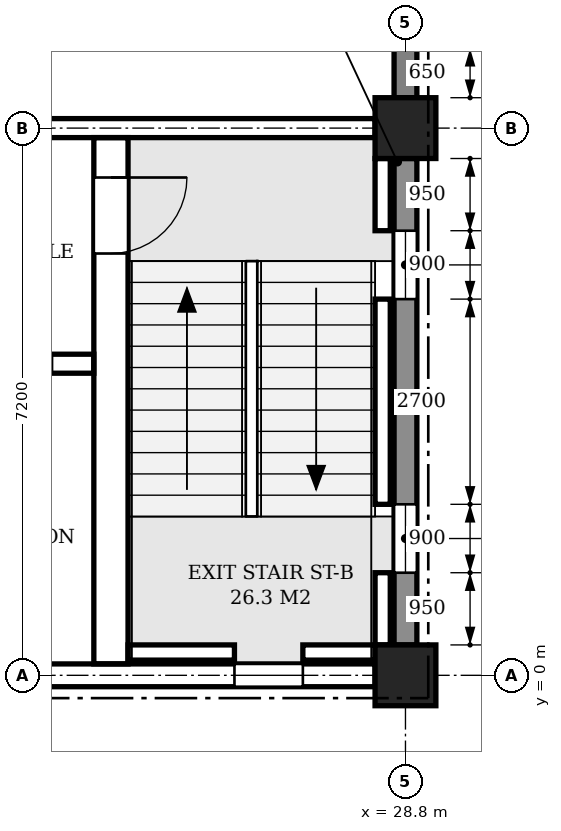
"""IFC4 building model, lengths in metres.
Left out: names, types, materials, properties, quantities, classifications, styles, units other than length and angle.
Written with IfcOpenShell. Run it as: python <this file> out.ifc"""

import sys

from ifc_helpers import new_model, si_unit, direction, frame, frame_2d, origin, origin_2d, place, context, subcontext, project, spatial, polyline, rectangle, outline, extrude, element, fill, save


model = new_model("IFC4")
c1 = context("Model", 3, precision=1e-05, world=origin(), true_north=direction((0.0, 1.0)))
c2 = subcontext(c1, "Body", "Model", "MODEL_VIEW")
j1 = project(units=[si_unit("LENGTHUNIT", "METRE"), si_unit("PLANEANGLEUNIT", "RADIAN")], contexts=[c1])
p1 = place(None, origin())
s1 = spatial("IfcSite", under=j1, at=p1, CompositionType="ELEMENT")
p2 = place(p1, origin())
s2 = spatial("IfcBuilding", under=s1, at=p2, CompositionType="ELEMENT")
p3 = place(p2, frame((0.0, 0.0, 49.8)))
s3 = spatial("IfcBuildingStorey", under=s2, at=p3, CompositionType="ELEMENT", Elevation=49.8)
for number, where, z_axis, x_axis in (
    (1, (28.8, 0.0, 0.0), (0.0, 0.0, 1.0), (1.0, 0.0, 0.0)),
    (2, (28.8, 7.2, 0.0), (0.0, 0.0, 1.0), (1.0, 0.0, 0.0)),
):
    element("IfcColumn", number, at=place(p3, frame(where, z_axis=z_axis, x_axis=x_axis)), inside=s3, PredefinedType="COLUMN", context=c2, shape_type="SweptSolid", body=[
        extrude(rectangle(XDim=0.8, YDim=0.8, at=origin_2d()), origin(), (0.0, 0.0, 1.0), 4.5),
    ])
p4 = place(p3, frame((22.0, 0.0, 0.0), z_axis=(0.0, 0.0, 1.0), x_axis=(1.0, 0.0, 0.0)))
e3 = element("IfcWall", 3, at=p4, inside=s3, PredefinedType="STANDARD", context=c2, shape_type="SweptSolid", body=[
    extrude(rectangle(XDim=6.4, YDim=0.3, at=frame_2d((3.2, 0.0))), origin(), (0.0, 0.0, 1.0), 3.65),
])
p5 = place(p4, frame((4.55, 0.0, 0.9)))
e4 = element("IfcOpeningElement", 4, at=p5, cuts=e3, PredefinedType="OPENING", context=c2, shape_type="SweptSolid", body=[
    extrude(outline(polyline([(0.0, 0.0), (0.9, 0.0), (0.9, 2.15), (0.45, 2.6), (0.0, 2.15), (0.0, 0.0)])), frame((0.0, 0.16, 0.0), z_axis=(0.0, -1.0, 0.0), x_axis=(1.0, 0.0, 0.0)), (0.0, 0.0, 1.0), 0.32),
])
p6 = place(p3, frame((28.8, 0.4, 0.0), z_axis=(0.0, 0.0, 1.0), x_axis=(0.0, 1.0, 0.0)))
e5 = element("IfcWall", 5, at=p6, inside=s3, PredefinedType="STANDARD", context=c2, shape_type="SweptSolid", body=[
    extrude(rectangle(XDim=6.4, YDim=0.3, at=frame_2d((3.2, 0.0))), origin(), (0.0, 0.0, 1.0), 3.65),
])
p7 = place(p6, frame((0.95, 0.0, 0.9)))
e6 = element("IfcOpeningElement", 6, at=p7, cuts=e5, PredefinedType="OPENING", context=c2, shape_type="SweptSolid", body=[
    extrude(outline(polyline([(0.0, 0.0), (0.9, 0.0), (0.9, 2.15), (0.45, 2.6), (0.0, 2.15), (0.0, 0.0)])), frame((0.0, 0.16, 0.0), z_axis=(0.0, -1.0, 0.0), x_axis=(1.0, 0.0, 0.0)), (0.0, 0.0, 1.0), 0.32),
])
p8 = place(p6, frame((4.55, 0.0, 0.9)))
e7 = element("IfcOpeningElement", 7, at=p8, cuts=e5, PredefinedType="OPENING", context=c2, shape_type="SweptSolid", body=[
    extrude(outline(polyline([(0.0, 0.0), (0.9, 0.0), (0.9, 2.15), (0.45, 2.6), (0.0, 2.15), (0.0, 0.0)])), frame((0.0, 0.16, 0.0), z_axis=(0.0, -1.0, 0.0), x_axis=(1.0, 0.0, 0.0)), (0.0, 0.0, 1.0), 0.32),
])
p9 = place(p3, frame((28.8, 7.6, 0.0), z_axis=(0.0, 0.0, 1.0), x_axis=(0.0, 1.0, 0.0)))
e8 = element("IfcWall", 8, at=p9, inside=s3, PredefinedType="STANDARD", context=c2, shape_type="SweptSolid", body=[
    extrude(rectangle(XDim=6.4, YDim=0.3, at=frame_2d((3.2, 0.0))), origin(), (0.0, 0.0, 1.0), 3.65),
])
p10 = place(p9, frame((0.65, 0.0, 0.9)))
e9 = element("IfcOpeningElement", 9, at=p10, cuts=e8, PredefinedType="OPENING", context=c2, shape_type="SweptSolid", body=[
    extrude(outline(polyline([(0.0, 0.0), (1.5, 0.0), (1.5, 1.85), (0.75, 2.6), (0.0, 1.85), (0.0, 0.0)])), frame((0.0, 0.16, 0.0), z_axis=(0.0, -1.0, 0.0), x_axis=(1.0, 0.0, 0.0)), (0.0, 0.0, 1.0), 0.32),
])
p11 = place(p3, frame((22.0, 7.2, 0.0), z_axis=(0.0, 0.0, 1.0), x_axis=(1.0, 0.0, 0.0)))
e10 = element("IfcWall", 10, at=p11, inside=s3, PredefinedType="SHEAR", context=c2, shape_type="SweptSolid", body=[
    extrude(rectangle(XDim=6.4, YDim=0.25, at=frame_2d((3.2, 0.0))), origin(), (0.0, 0.0, 1.0), 3.55),
])
p12 = place(p11, frame((0.45, 0.0, 0.0)))
e11 = element("IfcOpeningElement", 11, at=p12, cuts=e10, PredefinedType="OPENING", context=c2, shape_type="SweptSolid", body=[
    extrude(rectangle(XDim=1.1, YDim=2.1, at=frame_2d((0.55, 1.05))), frame((0.0, 0.135, 0.0), z_axis=(0.0, -1.0, 0.0), x_axis=(1.0, 0.0, 0.0)), (0.0, 0.0, 1.0), 0.27),
])
p13 = place(p3, frame((28.5, 0.4, -0.25), z_axis=(0.0, 0.0, 1.0), x_axis=(0.0, 1.0, 0.0)))
e12 = element("IfcWall", 12, at=p13, inside=s3, PredefinedType="SHEAR", context=c2, shape_type="SweptSolid", body=[
    extrude(rectangle(XDim=0.95, YDim=0.2, at=frame_2d((0.475, 0.0))), origin(), (0.0, 0.0, 1.0), 4.5),
])
p14 = place(p3, frame((28.5, 2.25, -0.25), z_axis=(0.0, 0.0, 1.0), x_axis=(0.0, 1.0, 0.0)))
e13 = element("IfcWall", 13, at=p14, inside=s3, PredefinedType="SHEAR", context=c2, shape_type="SweptSolid", body=[
    extrude(rectangle(XDim=2.7, YDim=0.2, at=frame_2d((1.35, 0.0))), origin(), (0.0, 0.0, 1.0), 4.5),
])
p15 = place(p3, frame((28.5, 5.85, -0.25), z_axis=(0.0, 0.0, 1.0), x_axis=(0.0, 1.0, 0.0)))
e14 = element("IfcWall", 14, at=p15, inside=s3, PredefinedType="SHEAR", context=c2, shape_type="SweptSolid", body=[
    extrude(rectangle(XDim=0.95, YDim=0.2, at=frame_2d((0.475, 0.0))), origin(), (0.0, 0.0, 1.0), 4.5),
])
p16 = place(p3, frame((25.15, 0.3, -0.25), z_axis=(0.0, 0.0, 1.0), x_axis=(1.0, 0.0, 0.0)))
e15 = element("IfcWall", 15, at=p16, inside=s3, PredefinedType="SHEAR", context=c2, shape_type="SweptSolid", body=[
    extrude(rectangle(XDim=1.4, YDim=0.2, at=frame_2d((0.7, 0.0))), origin(), (0.0, 0.0, 1.0), 4.5),
])
p17 = place(p3, frame((27.45, 0.3, -0.25), z_axis=(0.0, 0.0, 1.0), x_axis=(1.0, 0.0, 0.0)))
e16 = element("IfcWall", 16, at=p17, inside=s3, PredefinedType="SHEAR", context=c2, shape_type="SweptSolid", body=[
    extrude(rectangle(XDim=0.95, YDim=0.2, at=frame_2d((0.475, 0.0))), origin(), (0.0, 0.0, 1.0), 4.5),
])
p18 = place(p3, frame((24.925, 0.15, 0.0), z_axis=(0.0, 0.0, 1.0), x_axis=(0.0, 1.0, 0.0)))
e17 = element("IfcWall", 17, at=p18, inside=s3, PredefinedType="SHEAR", context=c2, shape_type="SweptSolid", body=[
    extrude(rectangle(XDim=6.925, YDim=0.45, at=frame_2d((3.462, 0.0))), origin(), (0.0, 0.0, 1.0), 4.25),
])
p19 = place(p18, frame((5.4, 0.0, 0.0)))
e18 = element("IfcOpeningElement", 18, at=p19, cuts=e17, PredefinedType="OPENING", context=c2, shape_type="SweptSolid", body=[
    extrude(rectangle(XDim=1.0, YDim=2.1, at=frame_2d((0.5, 1.05))), frame((0.0, 0.235, 0.0), z_axis=(0.0, -1.0, 0.0), x_axis=(1.0, 0.0, 0.0)), (0.0, 0.0, 1.0), 0.47),
])
p20 = place(p3, frame((21.725, 4.1, 0.0), z_axis=(0.0, 0.0, 1.0), x_axis=(1.0, 0.0, 0.0)))
e19 = element("IfcWall", 19, at=p20, inside=s3, PredefinedType="SHEAR", context=c2, shape_type="SweptSolid", body=[
    extrude(rectangle(XDim=2.975, YDim=0.25, at=frame_2d((1.487, 0.0))), origin(), (0.0, 0.0, 1.0), 4.25),
])
p21 = place(p20, frame((1.525, 0.0, 0.0)))
e20 = element("IfcOpeningElement", 20, at=p21, cuts=e19, PredefinedType="OPENING", context=c2, shape_type="SweptSolid", body=[
    extrude(rectangle(XDim=0.9, YDim=2.1, at=frame_2d((0.45, 1.05))), frame((0.0, 0.135, 0.0), z_axis=(0.0, -1.0, 0.0), x_axis=(1.0, 0.0, 0.0)), (0.0, 0.0, 1.0), 0.27),
])
p22 = place(p7, origin())
e21 = element("IfcWindow", 21, at=p22, inside=s3, PartitioningType="SINGLE_PANEL", PredefinedType="WINDOW", context=c2, shape_type="SweptSolid", body=[
    extrude(outline(polyline([(0.0, 0.0), (0.9, 0.0), (0.9, 2.15), (0.45, 2.6), (0.0, 2.15), (0.0, 0.0)])), frame((0.0, 0.03, 0.0), z_axis=(0.0, -1.0, 0.0), x_axis=(1.0, 0.0, 0.0)), (0.0, 0.0, 1.0), 0.06),
])
fill(e6, e21)
p23 = place(p8, origin())
e22 = element("IfcWindow", 22, at=p23, inside=s3, PartitioningType="SINGLE_PANEL", PredefinedType="WINDOW", context=c2, shape_type="SweptSolid", body=[
    extrude(outline(polyline([(0.0, 0.0), (0.9, 0.0), (0.9, 2.15), (0.45, 2.6), (0.0, 2.15), (0.0, 0.0)])), frame((0.0, 0.03, 0.0), z_axis=(0.0, -1.0, 0.0), x_axis=(1.0, 0.0, 0.0)), (0.0, 0.0, 1.0), 0.06),
])
fill(e7, e22)
p24 = place(p5, origin())
e23 = element("IfcWindow", 23, at=p24, inside=s3, PartitioningType="SINGLE_PANEL", PredefinedType="WINDOW", context=c2, shape_type="SweptSolid", body=[
    extrude(outline(polyline([(0.0, 0.0), (0.9, 0.0), (0.9, 2.15), (0.45, 2.6), (0.0, 2.15), (0.0, 0.0)])), frame((0.0, 0.03, 0.0), z_axis=(0.0, -1.0, 0.0), x_axis=(1.0, 0.0, 0.0)), (0.0, 0.0, 1.0), 0.06),
])
fill(e4, e23)
p25 = place(p19, frame((1.0, 0.0, 0.0), z_axis=(0.0, 0.0, 1.0), x_axis=(-1.0, 0.0, 0.0)))
e24 = element("IfcDoor", 24, at=p25, inside=s3, OperationType="SINGLE_SWING_LEFT", PredefinedType="DOOR", context=c2, shape_type="SweptSolid", body=[
    extrude(rectangle(XDim=1.0, YDim=2.1, at=frame_2d((0.5, 1.05))), frame((0.0, 0.025, 0.0), z_axis=(0.0, -1.0, 0.0), x_axis=(1.0, 0.0, 0.0)), (0.0, 0.0, 1.0), 0.05),
])
fill(e18, e24)
save(model, sys.argv[1])
